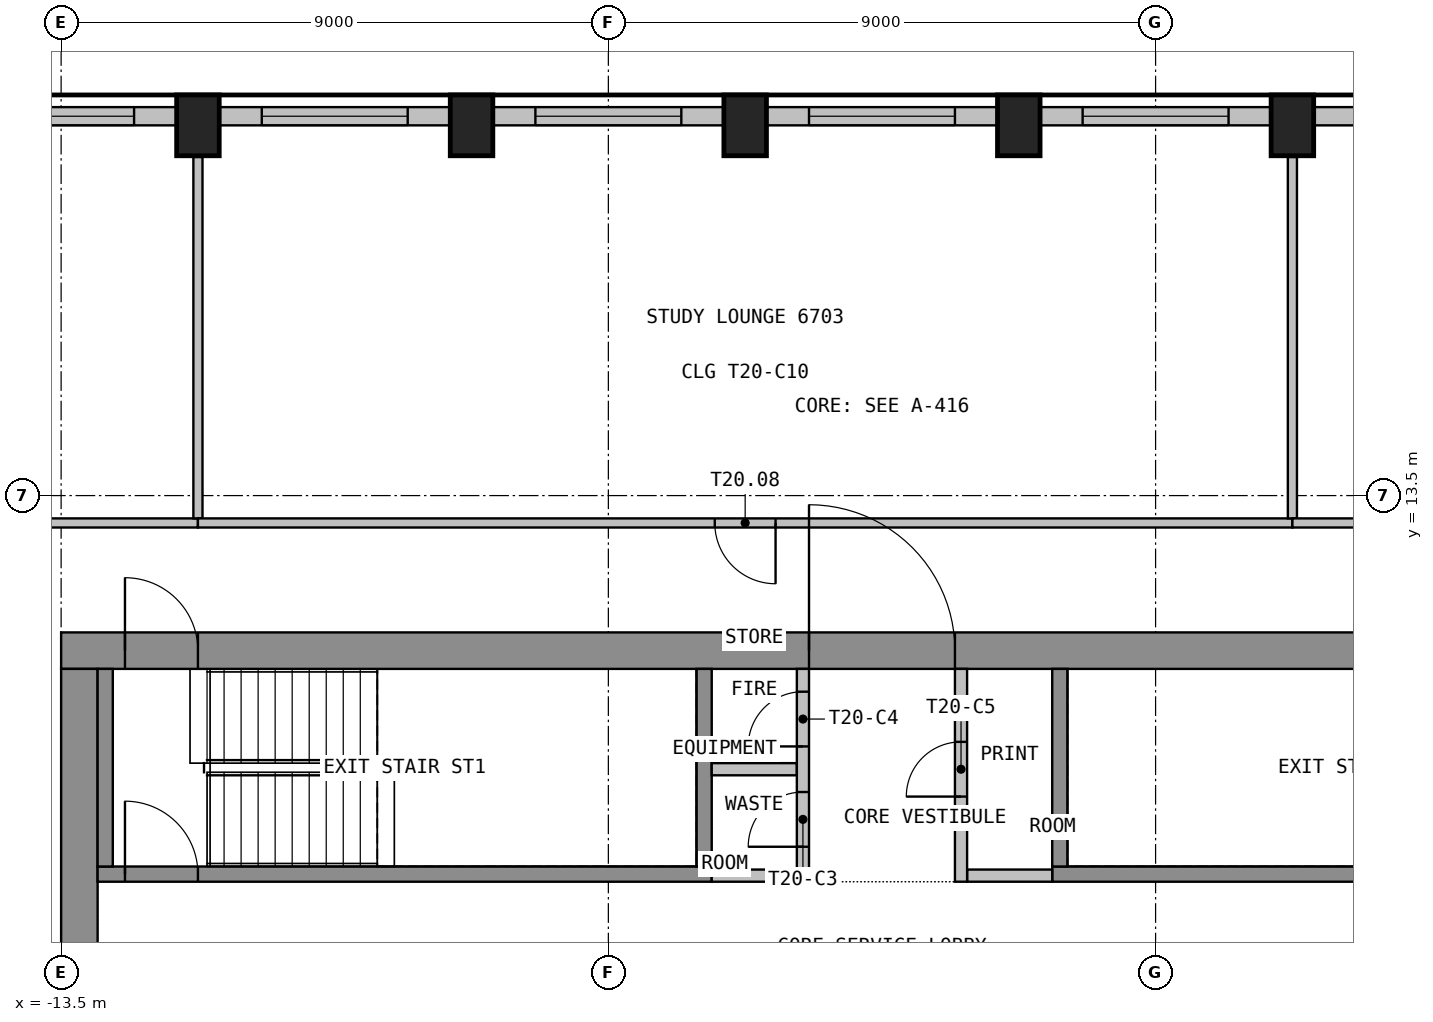
"""IFC4 building model, lengths in metres.
Left out: names, types, materials, properties, quantities, classifications, styles, units other than length and angle.
Written with IfcOpenShell. Run it as: python <this file> out.ifc"""

import sys

from ifc_helpers import new_model, si_unit, direction, frame, frame_2d, origin, origin_2d, place, context, subcontext, project, spatial, rectangle, extrude, element, fill, save


model = new_model("IFC4")
c1 = context("Model", 3, precision=1e-05, world=origin(), true_north=direction((0.0, 1.0)))
c2 = subcontext(c1, "Body", "Model", "MODEL_VIEW")
j1 = project(units=[si_unit("LENGTHUNIT", "METRE"), si_unit("PLANEANGLEUNIT", "RADIAN")], contexts=[c1])
p1 = place(None, origin())
s1 = spatial("IfcSite", under=j1, at=p1, CompositionType="ELEMENT")
p2 = place(p1, origin())
s2 = spatial("IfcBuilding", under=s1, at=p2, CompositionType="ELEMENT")
p3 = place(p2, frame((0.0, 0.0, 270.3)))
s3 = spatial("IfcBuildingStorey", under=s2, at=p3, CompositionType="ELEMENT", Elevation=270.3)
for number, where, z_axis, x_axis in (
    (1, (6.75, 19.588, 0.0), (0.0, 0.0, 1.0), (-1.0, 0.0, 0.0)),
    (2, (2.25, 19.588, 0.0), (0.0, 0.0, 1.0), (-1.0, 0.0, 0.0)),
    (3, (-2.25, 19.588, 0.0), (0.0, 0.0, 1.0), (-1.0, 0.0, 0.0)),
    (4, (-6.75, 19.588, 0.0), (0.0, 0.0, 1.0), (-1.0, 0.0, 0.0)),
    (5, (-11.25, 19.588, 0.0), (0.0, 0.0, 1.0), (-1.0, 0.0, 0.0)),
):
    element("IfcColumn", number, at=place(p3, frame(where, z_axis=z_axis, x_axis=x_axis)), inside=s3, PredefinedType="COLUMN", context=c2, shape_type="SweptSolid", body=[
        extrude(rectangle(XDim=0.7, YDim=1.0, at=origin_2d()), origin(), (0.0, 0.0, 1.0), 3.575),
    ])
p4 = place(p3, frame((10.899, 19.739, 0.0), z_axis=(0.0, 0.0, 1.0), x_axis=(-1.0, 0.0, 0.0)))
e6 = element("IfcWall", 6, at=p4, inside=s3, PredefinedType="SOLIDWALL", context=c2, shape_type="SweptSolid", body=[
    extrude(rectangle(XDim=3.799, YDim=0.3, at=frame_2d((1.899, 0.0))), origin(), (0.0, 0.0, 1.0), 3.575),
])
p5 = place(p4, frame((0.699, 0.0, 0.9)))
e7 = element("IfcOpeningElement", 7, at=p5, cuts=e6, PredefinedType="OPENING", context=c2, shape_type="SweptSolid", body=[
    extrude(rectangle(XDim=2.4, YDim=2.1, at=frame_2d((1.2, 1.05))), frame((0.0, 0.16, 0.0), z_axis=(0.0, -1.0, 0.0), x_axis=(1.0, 0.0, 0.0)), (0.0, 0.0, 1.0), 0.32),
])
p6 = place(p3, frame((6.399, 19.739, 0.0), z_axis=(0.0, 0.0, 1.0), x_axis=(-1.0, 0.0, 0.0)))
e8 = element("IfcWall", 8, at=p6, inside=s3, PredefinedType="SOLIDWALL", context=c2, shape_type="SweptSolid", body=[
    extrude(rectangle(XDim=3.799, YDim=0.3, at=frame_2d((1.899, 0.0))), origin(), (0.0, 0.0, 1.0), 3.575),
])
p7 = place(p6, frame((0.699, 0.0, 0.9)))
e9 = element("IfcOpeningElement", 9, at=p7, cuts=e8, PredefinedType="OPENING", context=c2, shape_type="SweptSolid", body=[
    extrude(rectangle(XDim=2.4, YDim=2.1, at=frame_2d((1.2, 1.05))), frame((0.0, 0.16, 0.0), z_axis=(0.0, -1.0, 0.0), x_axis=(1.0, 0.0, 0.0)), (0.0, 0.0, 1.0), 0.32),
])
p8 = place(p3, frame((1.899, 19.739, 0.0), z_axis=(0.0, 0.0, 1.0), x_axis=(-1.0, 0.0, 0.0)))
e10 = element("IfcWall", 10, at=p8, inside=s3, PredefinedType="SOLIDWALL", context=c2, shape_type="SweptSolid", body=[
    extrude(rectangle(XDim=3.799, YDim=0.3, at=frame_2d((1.899, 0.0))), origin(), (0.0, 0.0, 1.0), 3.575),
])
p9 = place(p8, frame((0.699, 0.0, 0.9)))
e11 = element("IfcOpeningElement", 11, at=p9, cuts=e10, PredefinedType="OPENING", context=c2, shape_type="SweptSolid", body=[
    extrude(rectangle(XDim=2.4, YDim=2.1, at=frame_2d((1.2, 1.05))), frame((0.0, 0.16, 0.0), z_axis=(0.0, -1.0, 0.0), x_axis=(1.0, 0.0, 0.0)), (0.0, 0.0, 1.0), 0.32),
])
p10 = place(p3, frame((-2.601, 19.739, 0.0), z_axis=(0.0, 0.0, 1.0), x_axis=(-1.0, 0.0, 0.0)))
e12 = element("IfcWall", 12, at=p10, inside=s3, PredefinedType="SOLIDWALL", context=c2, shape_type="SweptSolid", body=[
    extrude(rectangle(XDim=3.799, YDim=0.3, at=frame_2d((1.899, 0.0))), origin(), (0.0, 0.0, 1.0), 3.575),
])
p11 = place(p10, frame((0.699, 0.0, 0.9)))
e13 = element("IfcOpeningElement", 13, at=p11, cuts=e12, PredefinedType="OPENING", context=c2, shape_type="SweptSolid", body=[
    extrude(rectangle(XDim=2.4, YDim=2.1, at=frame_2d((1.2, 1.05))), frame((0.0, 0.16, 0.0), z_axis=(0.0, -1.0, 0.0), x_axis=(1.0, 0.0, 0.0)), (0.0, 0.0, 1.0), 0.32),
])
p12 = place(p3, frame((-7.101, 19.739, 0.0), z_axis=(0.0, 0.0, 1.0), x_axis=(-1.0, 0.0, 0.0)))
e14 = element("IfcWall", 14, at=p12, inside=s3, PredefinedType="SOLIDWALL", context=c2, shape_type="SweptSolid", body=[
    extrude(rectangle(XDim=3.799, YDim=0.3, at=frame_2d((1.899, 0.0))), origin(), (0.0, 0.0, 1.0), 3.575),
])
p13 = place(p12, frame((0.699, 0.0, 0.9)))
e15 = element("IfcOpeningElement", 15, at=p13, cuts=e14, PredefinedType="OPENING", context=c2, shape_type="SweptSolid", body=[
    extrude(rectangle(XDim=2.4, YDim=2.1, at=frame_2d((1.2, 1.05))), frame((0.0, 0.16, 0.0), z_axis=(0.0, -1.0, 0.0), x_axis=(1.0, 0.0, 0.0)), (0.0, 0.0, 1.0), 0.32),
])
p14 = place(p3, frame((-11.601, 19.739, 0.0), z_axis=(0.0, 0.0, 1.0), x_axis=(-1.0, 0.0, 0.0)))
e16 = element("IfcWall", 16, at=p14, inside=s3, PredefinedType="SOLIDWALL", context=c2, shape_type="SweptSolid", body=[
    extrude(rectangle(XDim=3.498, YDim=0.3, at=frame_2d((1.749, 0.0))), origin(), (0.0, 0.0, 1.0), 3.575),
])
p15 = place(p14, frame((0.699, 0.0, 0.9)))
e17 = element("IfcOpeningElement", 17, at=p15, cuts=e16, PredefinedType="OPENING", context=c2, shape_type="SweptSolid", body=[
    extrude(rectangle(XDim=2.4, YDim=2.1, at=frame_2d((1.2, 1.05))), frame((0.0, 0.16, 0.0), z_axis=(0.0, -1.0, 0.0), x_axis=(1.0, 0.0, 0.0)), (0.0, 0.0, 1.0), 0.32),
])
p16 = place(p3, frame((-13.5, 10.95, 0.0), z_axis=(0.0, 0.0, 1.0), x_axis=(1.0, 0.0, 0.0)))
e18 = element("IfcWall", 18, at=p16, inside=s3, PredefinedType="SHEAR", context=c2, shape_type="SweptSolid", body=[
    extrude(rectangle(XDim=27.0, YDim=0.6, at=frame_2d((13.5, 0.0))), origin(), (0.0, 0.0, 1.0), 3.575),
])
p17 = place(p16, frame((12.3, 0.0, 0.0)))
e19 = element("IfcOpeningElement", 19, at=p17, cuts=e18, PredefinedType="OPENING", context=c2, shape_type="SweptSolid", body=[
    extrude(rectangle(XDim=2.4, YDim=2.1, at=frame_2d((1.2, 1.05))), frame((0.0, 0.31, 0.0), z_axis=(0.0, -1.0, 0.0), x_axis=(1.0, 0.0, 0.0)), (0.0, 0.0, 1.0), 0.62),
])
p18 = place(p16, frame((1.05, 0.0, 0.0)))
e20 = element("IfcOpeningElement", 20, at=p18, cuts=e18, PredefinedType="OPENING", context=c2, shape_type="SweptSolid", body=[
    extrude(rectangle(XDim=1.2, YDim=2.1, at=frame_2d((0.6, 1.05))), frame((0.0, 0.31, 0.0), z_axis=(0.0, -1.0, 0.0), x_axis=(1.0, 0.0, 0.0)), (0.0, 0.0, 1.0), 0.62),
])
p19 = place(p16, frame((24.75, 0.0, 0.0)))
e21 = element("IfcOpeningElement", 21, at=p19, cuts=e18, PredefinedType="OPENING", context=c2, shape_type="SweptSolid", body=[
    extrude(rectangle(XDim=1.2, YDim=2.1, at=frame_2d((0.6, 1.05))), frame((0.0, 0.31, 0.0), z_axis=(0.0, -1.0, 0.0), x_axis=(1.0, 0.0, 0.0)), (0.0, 0.0, 1.0), 0.62),
])
p20 = place(p3, frame((-13.2, -10.65, 0.0), z_axis=(0.0, 0.0, 1.0), x_axis=(0.0, 1.0, 0.0)))
e22 = element("IfcWall", 22, at=p20, inside=s3, PredefinedType="SHEAR", context=c2, shape_type="SweptSolid", body=[
    extrude(rectangle(XDim=21.3, YDim=0.6, at=frame_2d((10.65, 0.0))), origin(), (0.0, 0.0, 1.0), 3.575),
])
p21 = place(p20, frame((9.45, 0.0, 0.0)))
e23 = element("IfcOpeningElement", 23, at=p21, cuts=e22, PredefinedType="OPENING", context=c2, shape_type="SweptSolid", body=[
    extrude(rectangle(XDim=2.4, YDim=2.1, at=frame_2d((1.2, 1.05))), frame((0.0, 0.31, 0.0), z_axis=(0.0, -1.0, 0.0), x_axis=(1.0, 0.0, 0.0)), (0.0, 0.0, 1.0), 0.62),
])
p22 = place(p3, frame((-12.9, 7.275, 0.0), z_axis=(0.0, 0.0, 1.0), x_axis=(1.0, 0.0, 0.0)))
e24 = element("IfcWall", 24, at=p22, inside=s3, PredefinedType="SHEAR", context=c2, shape_type="SweptSolid", body=[
    extrude(rectangle(XDim=10.1, YDim=0.25, at=frame_2d((5.05, 0.0))), origin(), (0.0, 0.0, 1.0), 3.575),
])
p23 = place(p22, frame((0.45, 0.0, 0.0)))
e25 = element("IfcOpeningElement", 25, at=p23, cuts=e24, PredefinedType="OPENING", context=c2, shape_type="SweptSolid", body=[
    extrude(rectangle(XDim=1.2, YDim=2.1, at=frame_2d((0.6, 1.05))), frame((0.0, 0.135, 0.0), z_axis=(0.0, -1.0, 0.0), x_axis=(1.0, 0.0, 0.0)), (0.0, 0.0, 1.0), 0.27),
])
for number, where, z_axis, x_axis in (
    (26, (-12.775, 7.4, 0.0), (0.0, 0.0, 1.0), (0.0, 1.0, 0.0)),
    (27, (-2.925, 7.4, 0.0), (0.0, 0.0, 1.0), (0.0, 1.0, 0.0)),
):
    element("IfcWall", number, at=place(p3, frame(where, z_axis=z_axis, x_axis=x_axis)), inside=s3, PredefinedType="SHEAR", context=c2, shape_type="SweptSolid", body=[
        extrude(rectangle(XDim=3.25, YDim=0.25, at=frame_2d((1.625, 0.0))), origin(), (0.0, 0.0, 1.0), 3.575),
    ])
p24 = place(p3, frame((2.8, 7.275, 0.0), z_axis=(0.0, 0.0, 1.0), x_axis=(1.0, 0.0, 0.0)))
e28 = element("IfcWall", 28, at=p24, inside=s3, PredefinedType="SHEAR", context=c2, shape_type="SweptSolid", body=[
    extrude(rectangle(XDim=10.1, YDim=0.25, at=frame_2d((5.05, 0.0))), origin(), (0.0, 0.0, 1.0), 3.575),
])
p25 = place(p24, frame((8.45, 0.0, 0.0)))
e29 = element("IfcOpeningElement", 29, at=p25, cuts=e28, PredefinedType="OPENING", context=c2, shape_type="SweptSolid", body=[
    extrude(rectangle(XDim=1.2, YDim=2.1, at=frame_2d((0.6, 1.05))), frame((0.0, 0.135, 0.0), z_axis=(0.0, -1.0, 0.0), x_axis=(1.0, 0.0, 0.0)), (0.0, 0.0, 1.0), 0.27),
])
p26 = place(p3, frame((2.925, 7.4, 0.0), z_axis=(0.0, 0.0, 1.0), x_axis=(0.0, 1.0, 0.0)))
e30 = element("IfcWall", 30, at=p26, inside=s3, PredefinedType="SHEAR", context=c2, shape_type="SweptSolid", body=[
    extrude(rectangle(XDim=3.25, YDim=0.25, at=frame_2d((1.625, 0.0))), origin(), (0.0, 0.0, 1.0), 3.575),
])
for number, where, z_axis, x_axis in (
    (31, (-2.8, 7.25, 0.0), (0.0, 0.0, 1.0), (1.0, 0.0, 0.0)),
    (32, (-2.8, 9.0, 0.0), (0.0, 0.0, 1.0), (1.0, 0.0, 0.0)),
    (33, (1.4, 7.25, 0.0), (0.0, 0.0, 1.0), (1.0, 0.0, 0.0)),
):
    element("IfcWall", number, at=place(p3, frame(where, z_axis=z_axis, x_axis=x_axis)), inside=s3, PredefinedType="PARTITIONING", context=c2, shape_type="SweptSolid", body=[
        extrude(rectangle(XDim=1.4, YDim=0.2, at=frame_2d((0.7, 0.0))), origin(), (0.0, 0.0, 1.0), 3.575),
    ])
p27 = place(p3, frame((-1.3, 7.15, 0.0), z_axis=(0.0, 0.0, 1.0), x_axis=(0.0, 1.0, 0.0)))
e34 = element("IfcWall", 34, at=p27, inside=s3, PredefinedType="PARTITIONING", context=c2, shape_type="SweptSolid", body=[
    extrude(rectangle(XDim=3.5, YDim=0.2, at=frame_2d((1.75, 0.0))), origin(), (0.0, 0.0, 1.0), 3.575),
])
p28 = place(p27, frame((0.575, 0.0, 0.0)))
e35 = element("IfcOpeningElement", 35, at=p28, cuts=e34, PredefinedType="OPENING", context=c2, shape_type="SweptSolid", body=[
    extrude(rectangle(XDim=0.9, YDim=2.1, at=frame_2d((0.45, 1.05))), frame((0.0, 0.11, 0.0), z_axis=(0.0, -1.0, 0.0), x_axis=(1.0, 0.0, 0.0)), (0.0, 0.0, 1.0), 0.22),
])
p29 = place(p27, frame((2.225, 0.0, 0.0)))
e36 = element("IfcOpeningElement", 36, at=p29, cuts=e34, PredefinedType="OPENING", context=c2, shape_type="SweptSolid", body=[
    extrude(rectangle(XDim=0.9, YDim=2.1, at=frame_2d((0.45, 1.05))), frame((0.0, 0.11, 0.0), z_axis=(0.0, -1.0, 0.0), x_axis=(1.0, 0.0, 0.0)), (0.0, 0.0, 1.0), 0.22),
])
p30 = place(p3, frame((1.3, 7.15, 0.0), z_axis=(0.0, 0.0, 1.0), x_axis=(0.0, 1.0, 0.0)))
e37 = element("IfcWall", 37, at=p30, inside=s3, PredefinedType="PARTITIONING", context=c2, shape_type="SweptSolid", body=[
    extrude(rectangle(XDim=3.5, YDim=0.2, at=frame_2d((1.75, 0.0))), origin(), (0.0, 0.0, 1.0), 3.575),
])
p31 = place(p30, frame((1.4, 0.0, 0.0)))
e38 = element("IfcOpeningElement", 38, at=p31, cuts=e37, PredefinedType="OPENING", context=c2, shape_type="SweptSolid", body=[
    extrude(rectangle(XDim=0.9, YDim=2.1, at=frame_2d((0.45, 1.05))), frame((0.0, 0.11, 0.0), z_axis=(0.0, -1.0, 0.0), x_axis=(1.0, 0.0, 0.0)), (0.0, 0.0, 1.0), 0.22),
])
p32 = place(p3, frame((-11.25, 13.05, 0.0), z_axis=(0.0, 0.0, 1.0), x_axis=(-1.0, 0.0, 0.0)))
e39 = element("IfcWall", 39, at=p32, inside=s3, PredefinedType="PARTITIONING", context=c2, shape_type="SweptSolid", body=[
    extrude(rectangle(XDim=3.975, YDim=0.15, at=frame_2d((1.988, 0.0))), origin(), (0.0, 0.0, 1.0), 3.575),
])
p33 = place(p3, frame((-11.25, 19.069, 0.0), z_axis=(0.0, 0.0, 1.0), x_axis=(0.0, -1.0, 0.0)))
e40 = element("IfcWall", 40, at=p33, inside=s3, PredefinedType="PARTITIONING", context=c2, shape_type="SweptSolid", body=[
    extrude(rectangle(XDim=5.944, YDim=0.15, at=frame_2d((2.972, 0.0))), origin(), (0.0, 0.0, 1.0), 3.575),
])
p34 = place(p3, frame((6.75, 13.05, 0.0), z_axis=(0.0, 0.0, 1.0), x_axis=(-1.0, 0.0, 0.0)))
e41 = element("IfcWall", 41, at=p34, inside=s3, PredefinedType="PARTITIONING", context=c2, shape_type="SweptSolid", body=[
    extrude(rectangle(XDim=18.0, YDim=0.15, at=frame_2d((9.0, 0.0))), origin(), (0.0, 0.0, 1.0), 3.575),
])
p35 = place(p34, frame((8.5, 0.0, 0.0)))
e42 = element("IfcOpeningElement", 42, at=p35, cuts=e41, PredefinedType="OPENING", context=c2, shape_type="SweptSolid", body=[
    extrude(rectangle(XDim=1.0, YDim=2.1, at=frame_2d((0.5, 1.05))), frame((0.0, 0.085, 0.0), z_axis=(0.0, -1.0, 0.0), x_axis=(1.0, 0.0, 0.0)), (0.0, 0.0, 1.0), 0.17),
])
p36 = place(p3, frame((6.75, 19.069, 0.0), z_axis=(0.0, 0.0, 1.0), x_axis=(0.0, -1.0, 0.0)))
e43 = element("IfcWall", 43, at=p36, inside=s3, PredefinedType="PARTITIONING", context=c2, shape_type="SweptSolid", body=[
    extrude(rectangle(XDim=5.944, YDim=0.15, at=frame_2d((2.972, 0.0))), origin(), (0.0, 0.0, 1.0), 3.575),
])
p37 = place(p3, frame((15.375, 13.05, 0.0), z_axis=(0.0, 0.0, 1.0), x_axis=(-1.0, 0.0, 0.0)))
e44 = element("IfcWall", 44, at=p37, inside=s3, PredefinedType="PARTITIONING", context=c2, shape_type="SweptSolid", body=[
    extrude(rectangle(XDim=8.625, YDim=0.15, at=frame_2d((4.312, 0.0))), origin(), (0.0, 0.0, 1.0), 3.575),
])
p38 = place(p37, frame((3.812, 0.0, 0.0)))
e45 = element("IfcOpeningElement", 45, at=p38, cuts=e44, PredefinedType="OPENING", context=c2, shape_type="SweptSolid", body=[
    extrude(rectangle(XDim=1.0, YDim=2.1, at=frame_2d((0.5, 1.05))), frame((0.0, 0.085, 0.0), z_axis=(0.0, -1.0, 0.0), x_axis=(1.0, 0.0, 0.0)), (0.0, 0.0, 1.0), 0.17),
])
p39 = place(p7, origin())
e46 = element("IfcWindow", 46, at=p39, inside=s3, PartitioningType="SINGLE_PANEL", PredefinedType="WINDOW", context=c2, shape_type="SweptSolid", body=[
    extrude(rectangle(XDim=2.4, YDim=2.1, at=frame_2d((1.2, 1.05))), frame((0.0, 0.03, 0.0), z_axis=(0.0, -1.0, 0.0), x_axis=(1.0, 0.0, 0.0)), (0.0, 0.0, 1.0), 0.06),
])
fill(e9, e46)
p40 = place(p9, origin())
e47 = element("IfcWindow", 47, at=p40, inside=s3, PartitioningType="SINGLE_PANEL", PredefinedType="WINDOW", context=c2, shape_type="SweptSolid", body=[
    extrude(rectangle(XDim=2.4, YDim=2.1, at=frame_2d((1.2, 1.05))), frame((0.0, 0.03, 0.0), z_axis=(0.0, -1.0, 0.0), x_axis=(1.0, 0.0, 0.0)), (0.0, 0.0, 1.0), 0.06),
])
fill(e11, e47)
p41 = place(p11, origin())
e48 = element("IfcWindow", 48, at=p41, inside=s3, PartitioningType="SINGLE_PANEL", PredefinedType="WINDOW", context=c2, shape_type="SweptSolid", body=[
    extrude(rectangle(XDim=2.4, YDim=2.1, at=frame_2d((1.2, 1.05))), frame((0.0, 0.03, 0.0), z_axis=(0.0, -1.0, 0.0), x_axis=(1.0, 0.0, 0.0)), (0.0, 0.0, 1.0), 0.06),
])
fill(e13, e48)
p42 = place(p13, origin())
e49 = element("IfcWindow", 49, at=p42, inside=s3, PartitioningType="SINGLE_PANEL", PredefinedType="WINDOW", context=c2, shape_type="SweptSolid", body=[
    extrude(rectangle(XDim=2.4, YDim=2.1, at=frame_2d((1.2, 1.05))), frame((0.0, 0.03, 0.0), z_axis=(0.0, -1.0, 0.0), x_axis=(1.0, 0.0, 0.0)), (0.0, 0.0, 1.0), 0.06),
])
fill(e15, e49)
p43 = place(p15, origin())
e50 = element("IfcWindow", 50, at=p43, inside=s3, PartitioningType="SINGLE_PANEL", PredefinedType="WINDOW", context=c2, shape_type="SweptSolid", body=[
    extrude(rectangle(XDim=2.4, YDim=2.1, at=frame_2d((1.2, 1.05))), frame((0.0, 0.03, 0.0), z_axis=(0.0, -1.0, 0.0), x_axis=(1.0, 0.0, 0.0)), (0.0, 0.0, 1.0), 0.06),
])
fill(e17, e50)
p44 = place(p17, origin())
e51 = element("IfcDoor", 51, at=p44, inside=s3, OperationType="DOUBLE_DOOR_DOUBLE_SWING", PredefinedType="DOOR", context=c2, shape_type="SweptSolid", body=[
    extrude(rectangle(XDim=2.4, YDim=2.1, at=frame_2d((1.2, 1.05))), frame((0.0, 0.025, 0.0), z_axis=(0.0, -1.0, 0.0), x_axis=(1.0, 0.0, 0.0)), (0.0, 0.0, 1.0), 0.05),
])
fill(e19, e51)
p45 = place(p18, origin())
e52 = element("IfcDoor", 52, at=p45, inside=s3, OperationType="SINGLE_SWING_RIGHT", PredefinedType="DOOR", context=c2, shape_type="SweptSolid", body=[
    extrude(rectangle(XDim=1.2, YDim=2.1, at=frame_2d((0.6, 1.05))), frame((0.0, 0.025, 0.0), z_axis=(0.0, -1.0, 0.0), x_axis=(1.0, 0.0, 0.0)), (0.0, 0.0, 1.0), 0.05),
])
fill(e20, e52)
p46 = place(p23, origin())
e53 = element("IfcDoor", 53, at=p46, inside=s3, OperationType="SINGLE_SWING_LEFT", PredefinedType="DOOR", context=c2, shape_type="SweptSolid", body=[
    extrude(rectangle(XDim=1.2, YDim=2.1, at=frame_2d((0.6, 1.05))), frame((0.0, 0.025, 0.0), z_axis=(0.0, -1.0, 0.0), x_axis=(1.0, 0.0, 0.0)), (0.0, 0.0, 1.0), 0.05),
])
fill(e25, e53)
p47 = place(p28, origin())
e54 = element("IfcDoor", 54, at=p47, inside=s3, OperationType="SINGLE_SWING_LEFT", PredefinedType="DOOR", context=c2, shape_type="SweptSolid", body=[
    extrude(rectangle(XDim=0.9, YDim=2.1, at=frame_2d((0.45, 1.05))), frame((0.0, 0.025, 0.0), z_axis=(0.0, -1.0, 0.0), x_axis=(1.0, 0.0, 0.0)), (0.0, 0.0, 1.0), 0.05),
])
fill(e35, e54)
p48 = place(p29, origin())
e55 = element("IfcDoor", 55, at=p48, inside=s3, OperationType="SINGLE_SWING_LEFT", PredefinedType="DOOR", context=c2, shape_type="SweptSolid", body=[
    extrude(rectangle(XDim=0.9, YDim=2.1, at=frame_2d((0.45, 1.05))), frame((0.0, 0.025, 0.0), z_axis=(0.0, -1.0, 0.0), x_axis=(1.0, 0.0, 0.0)), (0.0, 0.0, 1.0), 0.05),
])
fill(e36, e55)
p49 = place(p31, origin())
e56 = element("IfcDoor", 56, at=p49, inside=s3, OperationType="SINGLE_SWING_LEFT", PredefinedType="DOOR", context=c2, shape_type="SweptSolid", body=[
    extrude(rectangle(XDim=0.9, YDim=2.1, at=frame_2d((0.45, 1.05))), frame((0.0, 0.025, 0.0), z_axis=(0.0, -1.0, 0.0), x_axis=(1.0, 0.0, 0.0)), (0.0, 0.0, 1.0), 0.05),
])
fill(e38, e56)
p50 = place(p35, origin())
e57 = element("IfcDoor", 57, at=p50, inside=s3, OperationType="SINGLE_SWING_RIGHT", PredefinedType="DOOR", context=c2, shape_type="SweptSolid", body=[
    extrude(rectangle(XDim=1.0, YDim=2.1, at=frame_2d((0.5, 1.05))), frame((0.0, 0.025, 0.0), z_axis=(0.0, -1.0, 0.0), x_axis=(1.0, 0.0, 0.0)), (0.0, 0.0, 1.0), 0.05),
])
fill(e42, e57)
save(model, sys.argv[1])
